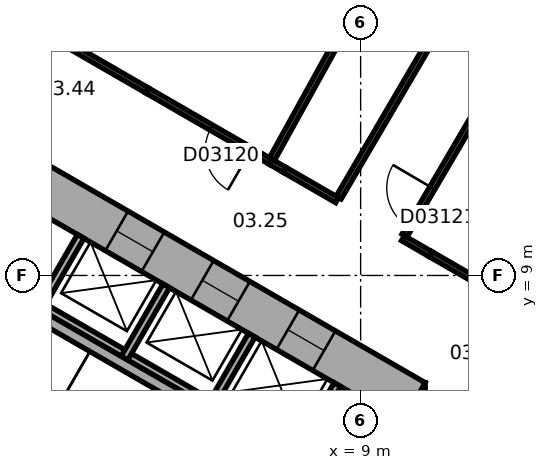
"""IFC4 building model, lengths in metres.
Left out: names, types, materials, properties, quantities, classifications, styles, units other than length and angle.
Written with IfcOpenShell. Run it as: python <this file> out.ifc"""

import sys

from ifc_helpers import new_model, si_unit, direction, frame, frame_2d, origin, place, context, subcontext, project, spatial, rectangle, extrude, element, fill, save


model = new_model("IFC4")
c1 = context("Model", 3, precision=1e-05, world=origin(), true_north=direction((0.0, 1.0)))
c2 = subcontext(c1, "Body", "Model", "MODEL_VIEW")
j1 = project(units=[si_unit("LENGTHUNIT", "METRE"), si_unit("PLANEANGLEUNIT", "RADIAN")], contexts=[c1])
p1 = place(None, origin())
s1 = spatial("IfcSite", under=j1, at=p1, CompositionType="ELEMENT")
p2 = place(p1, origin())
s2 = spatial("IfcBuilding", under=s1, at=p2, CompositionType="ELEMENT")
p3 = place(p2, frame((0.0, 0.0, 21.0)))
s3 = spatial("IfcBuildingStorey", under=s2, at=p3, CompositionType="ELEMENT", Elevation=21.0)
p4 = place(p3, frame((10.1, -6.177, 0.0), z_axis=(0.0, 0.0, 1.0), x_axis=(0.0, 1.0, 0.0)))
e1 = element("IfcWall", 1, at=p4, inside=s3, PredefinedType="SHEAR", context=c2, shape_type="SweptSolid", body=[
    extrude(rectangle(XDim=12.355, YDim=1.2, at=frame_2d((6.177, 0.0))), origin(), (0.0, 0.0, 1.0), 8.0),
])
p5 = place(p4, frame((6.378, 0.0, 0.0)))
e2 = element("IfcOpeningElement", 2, at=p5, cuts=e1, PredefinedType="OPENING", context=c2, shape_type="SweptSolid", body=[
    extrude(rectangle(XDim=1.5, YDim=2.1, at=frame_2d((0.75, 1.05))), frame((0.0, 0.61, 0.0), z_axis=(0.0, -1.0, 0.0), x_axis=(1.0, 0.0, 0.0)), (0.0, 0.0, 1.0), 1.22),
])
p6 = place(p4, frame((1.828, 0.0, 0.0)))
e3 = element("IfcOpeningElement", 3, at=p6, cuts=e1, PredefinedType="OPENING", context=c2, shape_type="SweptSolid", body=[
    extrude(rectangle(XDim=1.1, YDim=2.1, at=frame_2d((0.55, 1.05))), frame((0.0, 0.61, 0.0), z_axis=(0.0, -1.0, 0.0), x_axis=(1.0, 0.0, 0.0)), (0.0, 0.0, 1.0), 1.22),
])
p7 = place(p4, frame((4.427, 0.0, 0.0)))
e4 = element("IfcOpeningElement", 4, at=p7, cuts=e1, PredefinedType="OPENING", context=c2, shape_type="SweptSolid", body=[
    extrude(rectangle(XDim=1.1, YDim=2.1, at=frame_2d((0.55, 1.05))), frame((0.0, 0.61, 0.0), z_axis=(0.0, -1.0, 0.0), x_axis=(1.0, 0.0, 0.0)), (0.0, 0.0, 1.0), 1.22),
])
p8 = place(p3, frame((10.4, 5.658, 0.0), z_axis=(0.0, 0.0, 1.0), x_axis=(-0.866021384402, 0.500006961711, 0.0)))
e5 = element("IfcWall", 5, at=p8, inside=s3, PredefinedType="SHEAR", context=c2, shape_type="SweptSolid", body=[
    extrude(rectangle(XDim=12.355, YDim=1.2, at=frame_2d((6.178, 0.0))), origin(), (0.0, 0.0, 1.0), 8.0),
])
p9 = place(p8, frame((2.728, 0.0, 0.0)))
e6 = element("IfcOpeningElement", 6, at=p9, cuts=e5, PredefinedType="OPENING", context=c2, shape_type="SweptSolid", body=[
    extrude(rectangle(XDim=1.1, YDim=2.1, at=frame_2d((0.55, 1.05))), frame((0.0, 0.61, 0.0), z_axis=(0.0, -1.0, 0.0), x_axis=(1.0, 0.0, 0.0)), (0.0, 0.0, 1.0), 1.22),
])
p10 = place(p8, frame((5.328, 0.0, 0.0)))
e7 = element("IfcOpeningElement", 7, at=p10, cuts=e5, PredefinedType="OPENING", context=c2, shape_type="SweptSolid", body=[
    extrude(rectangle(XDim=1.1, YDim=2.1, at=frame_2d((0.55, 1.05))), frame((0.0, 0.61, 0.0), z_axis=(0.0, -1.0, 0.0), x_axis=(1.0, 0.0, 0.0)), (0.0, 0.0, 1.0), 1.22),
])
p11 = place(p8, frame((7.928, 0.0, 0.0)))
e8 = element("IfcOpeningElement", 8, at=p11, cuts=e5, PredefinedType="OPENING", context=c2, shape_type="SweptSolid", body=[
    extrude(rectangle(XDim=1.1, YDim=2.1, at=frame_2d((0.55, 1.05))), frame((0.0, 0.61, 0.0), z_axis=(0.0, -1.0, 0.0), x_axis=(1.0, 0.0, 0.0)), (0.0, 0.0, 1.0), 1.22),
])
p12 = place(p3, frame((7.424, 4.259, 0.0), z_axis=(0.0, 0.0, 1.0), x_axis=(-0.866026010844, 0.49999894854, 0.0)))
e9 = element("IfcWall", 9, at=p12, inside=s3, PredefinedType="PARTITIONING", context=c2, shape_type="SweptSolid", body=[
    extrude(rectangle(XDim=8.0, YDim=0.2, at=frame_2d((4.0, 0.0))), origin(), (0.0, 0.0, 1.0), 7.7),
])
for number, where, z_axis, x_axis in (
    (10, (7.287, 4.222, 0.0), (0.0, 0.0, 1.0), (0.5, 0.866, 0.0)),
    (11, (5.036, 5.522, 0.0), (0.0, 0.0, 1.0), (0.5, 0.866, 0.0)),
    (12, (2.784, 6.822, 0.0), (0.0, 0.0, 1.0), (0.5, 0.866, 0.0)),
    (13, (0.532, 8.122, 0.0), (0.0, 0.0, 1.0), (0.5, 0.866, 0.0)),
):
    element("IfcWall", number, at=place(p3, frame(where, z_axis=z_axis, x_axis=x_axis)), inside=s3, PredefinedType="PARTITIONING", context=c2, shape_type="SweptSolid", body=[
        extrude(rectangle(XDim=2.2, YDim=0.2, at=frame_2d((1.1, 0.0))), origin(), (0.0, 0.0, 1.0), 7.7),
    ])
p13 = place(p3, frame((6.303, 4.617, 0.0), z_axis=(0.0, 0.0, 1.0), x_axis=(-0.866027801685, 0.499995846692, 0.0)))
e14 = element("IfcWall", 14, at=p13, inside=s3, PredefinedType="SHEAR", context=c2, shape_type="SweptSolid", body=[
    extrude(rectangle(XDim=7.06, YDim=0.3, at=frame_2d((3.53, 0.0))), origin(), (0.0, 0.0, 1.0), 7.7),
])
p14 = place(p3, frame((10.833, 9.564, 0.0), z_axis=(0.0, 0.0, 1.0), x_axis=(0.866091368387, -0.499885728548, 0.0)))
e15 = element("IfcWall", 15, at=p14, inside=s3, PredefinedType="PARTITIONING", context=c2, shape_type="SweptSolid", body=[
    extrude(rectangle(XDim=2.761, YDim=0.15, at=frame_2d((1.381, 0.0))), origin(), (0.0, 0.0, 1.0), 7.7),
])
p15 = place(p3, frame((10.114, 9.98, 0.0), z_axis=(0.0, 0.0, 1.0), x_axis=(0.865848115047, -0.500306947453, 0.0)))
e16 = element("IfcWall", 16, at=p15, inside=s3, PredefinedType="PARTITIONING", context=c2, shape_type="SweptSolid", body=[
    extrude(rectangle(XDim=0.832, YDim=0.15, at=frame_2d((0.416, 0.0))), origin(), (0.0, 0.0, 1.0), 7.7),
])
p16 = place(p3, frame((8.422, 11.05, 0.0), z_axis=(0.0, 0.0, 1.0), x_axis=(0.50561651199, 0.862758333952, 0.0)))
e17 = element("IfcWall", 17, at=p16, inside=s3, PredefinedType="PARTITIONING", context=c2, shape_type="SweptSolid", body=[
    extrude(rectangle(XDim=7.118, YDim=0.15, at=frame_2d((3.559, 0.0))), origin(), (0.0, 0.0, 1.0), 6.9),
])
p17 = place(p3, frame((6.995, 11.781, 0.0), z_axis=(0.0, 0.0, 1.0), x_axis=(0.866076391369, -0.499911676512, 0.0)))
e18 = element("IfcWall", 18, at=p17, inside=s3, PredefinedType="PARTITIONING", context=c2, shape_type="SweptSolid", body=[
    extrude(rectangle(XDim=1.601, YDim=0.15, at=frame_2d((0.8, 0.0))), origin(), (0.0, 0.0, 1.0), 7.7),
])
p18 = place(p3, frame((6.995, 11.781, 0.0), z_axis=(0.0, 0.0, 1.0), x_axis=(-0.866281716711, 0.49955578997, 0.0)))
e19 = element("IfcWall", 19, at=p18, inside=s3, PredefinedType="PARTITIONING", context=c2, shape_type="SweptSolid", body=[
    extrude(rectangle(XDim=0.423, YDim=0.15, at=frame_2d((0.211, 0.0))), origin(), (0.0, 0.0, 1.0), 7.7),
])
p19 = place(p3, frame((6.629, 11.992, 0.0), z_axis=(0.0, 0.0, 1.0), x_axis=(-0.86599558016, 0.500051652475, 0.0)))
e20 = element("IfcWall", 20, at=p19, inside=s3, PredefinedType="PARTITIONING", context=c2, shape_type="SweptSolid", body=[
    extrude(rectangle(XDim=3.745, YDim=0.15, at=frame_2d((1.872, 0.0))), origin(), (0.0, 0.0, 1.0), 7.7),
])
p20 = place(p19, frame((0.6, 0.0, 0.0)))
e21 = element("IfcOpeningElement", 21, at=p20, cuts=e20, PredefinedType="OPENING", context=c2, shape_type="SweptSolid", body=[
    extrude(rectangle(XDim=1.2, YDim=2.1, at=frame_2d((0.6, 1.05))), frame((0.0, 0.085, 0.0), z_axis=(0.0, -1.0, 0.0), x_axis=(1.0, 0.0, 0.0)), (0.0, 0.0, 1.0), 0.17),
])
p21 = place(p3, frame((6.668, 12.062, 0.0), z_axis=(0.0, 0.0, 1.0), x_axis=(0.483795376692, 0.875181143245, 0.0)))
e22 = element("IfcWall", 22, at=p21, inside=s3, PredefinedType="PARTITIONING", context=c2, shape_type="SweptSolid", body=[
    extrude(rectangle(XDim=7.387, YDim=0.15, at=frame_2d((3.693, 0.0))), origin(), (0.0, 0.0, 1.0), 7.7),
])
p22 = place(p3, frame((3.386, 13.865, 0.0), z_axis=(0.0, 0.0, 1.0), x_axis=(-0.866006051527, 0.500033517596, 0.0)))
e23 = element("IfcWall", 23, at=p22, inside=s3, PredefinedType="PARTITIONING", context=c2, shape_type="SweptSolid", body=[
    extrude(rectangle(XDim=3.85, YDim=0.15, at=frame_2d((1.925, 0.0))), origin(), (0.0, 0.0, 1.0), 7.7),
])
p23 = place(p3, frame((13.772, 16.224, 0.0), z_axis=(0.0, 0.0, 1.0), x_axis=(-0.505547889018, -0.862798546539, 0.0)))
e24 = element("IfcWall", 24, at=p23, inside=s3, PredefinedType="PARTITIONING", context=c2, shape_type="SweptSolid", body=[
    extrude(rectangle(XDim=7.156, YDim=0.15, at=frame_2d((3.578, 0.0))), origin(), (0.0, 0.0, 1.0), 7.7),
])
p24 = place(p23, frame((5.706, 0.0, 0.0)))
e25 = element("IfcOpeningElement", 25, at=p24, cuts=e24, PredefinedType="OPENING", context=c2, shape_type="SweptSolid", body=[
    extrude(rectangle(XDim=1.2, YDim=2.1, at=frame_2d((0.6, 1.05))), frame((0.0, 0.085, 0.0), z_axis=(0.0, -1.0, 0.0), x_axis=(1.0, 0.0, 0.0)), (0.0, 0.0, 1.0), 0.17),
])
p25 = place(p9, origin())
e26 = element("IfcDoor", 26, at=p25, inside=s3, OperationType="DOUBLE_DOOR_SLIDING", PredefinedType="DOOR", context=c2, shape_type="SweptSolid", body=[
    extrude(rectangle(XDim=1.1, YDim=2.1, at=frame_2d((0.55, 1.05))), frame((0.0, 0.025, 0.0), z_axis=(0.0, -1.0, 0.0), x_axis=(1.0, 0.0, 0.0)), (0.0, 0.0, 1.0), 0.05),
])
fill(e6, e26)
p26 = place(p10, origin())
e27 = element("IfcDoor", 27, at=p26, inside=s3, OperationType="DOUBLE_DOOR_SLIDING", PredefinedType="DOOR", context=c2, shape_type="SweptSolid", body=[
    extrude(rectangle(XDim=1.1, YDim=2.1, at=frame_2d((0.55, 1.05))), frame((0.0, 0.025, 0.0), z_axis=(0.0, -1.0, 0.0), x_axis=(1.0, 0.0, 0.0)), (0.0, 0.0, 1.0), 0.05),
])
fill(e7, e27)
p27 = place(p11, origin())
e28 = element("IfcDoor", 28, at=p27, inside=s3, OperationType="DOUBLE_DOOR_SLIDING", PredefinedType="DOOR", context=c2, shape_type="SweptSolid", body=[
    extrude(rectangle(XDim=1.1, YDim=2.1, at=frame_2d((0.55, 1.05))), frame((0.0, 0.025, 0.0), z_axis=(0.0, -1.0, 0.0), x_axis=(1.0, 0.0, 0.0)), (0.0, 0.0, 1.0), 0.05),
])
fill(e8, e28)
p28 = place(p20, origin())
e29 = element("IfcDoor", 29, at=p28, inside=s3, OperationType="SINGLE_SWING_LEFT", PredefinedType="DOOR", context=c2, shape_type="SweptSolid", body=[
    extrude(rectangle(XDim=1.2, YDim=2.1, at=frame_2d((0.6, 1.05))), frame((0.0, 0.025, 0.0), z_axis=(0.0, -1.0, 0.0), x_axis=(1.0, 0.0, 0.0)), (0.0, 0.0, 1.0), 0.05),
])
fill(e21, e29)
p29 = place(p24, origin())
e30 = element("IfcDoor", 30, at=p29, inside=s3, OperationType="SINGLE_SWING_LEFT", PredefinedType="DOOR", context=c2, shape_type="SweptSolid", body=[
    extrude(rectangle(XDim=1.2, YDim=2.1, at=frame_2d((0.6, 1.05))), frame((0.0, 0.025, 0.0), z_axis=(0.0, -1.0, 0.0), x_axis=(1.0, 0.0, 0.0)), (0.0, 0.0, 1.0), 0.05),
])
fill(e25, e30)
save(model, sys.argv[1])
